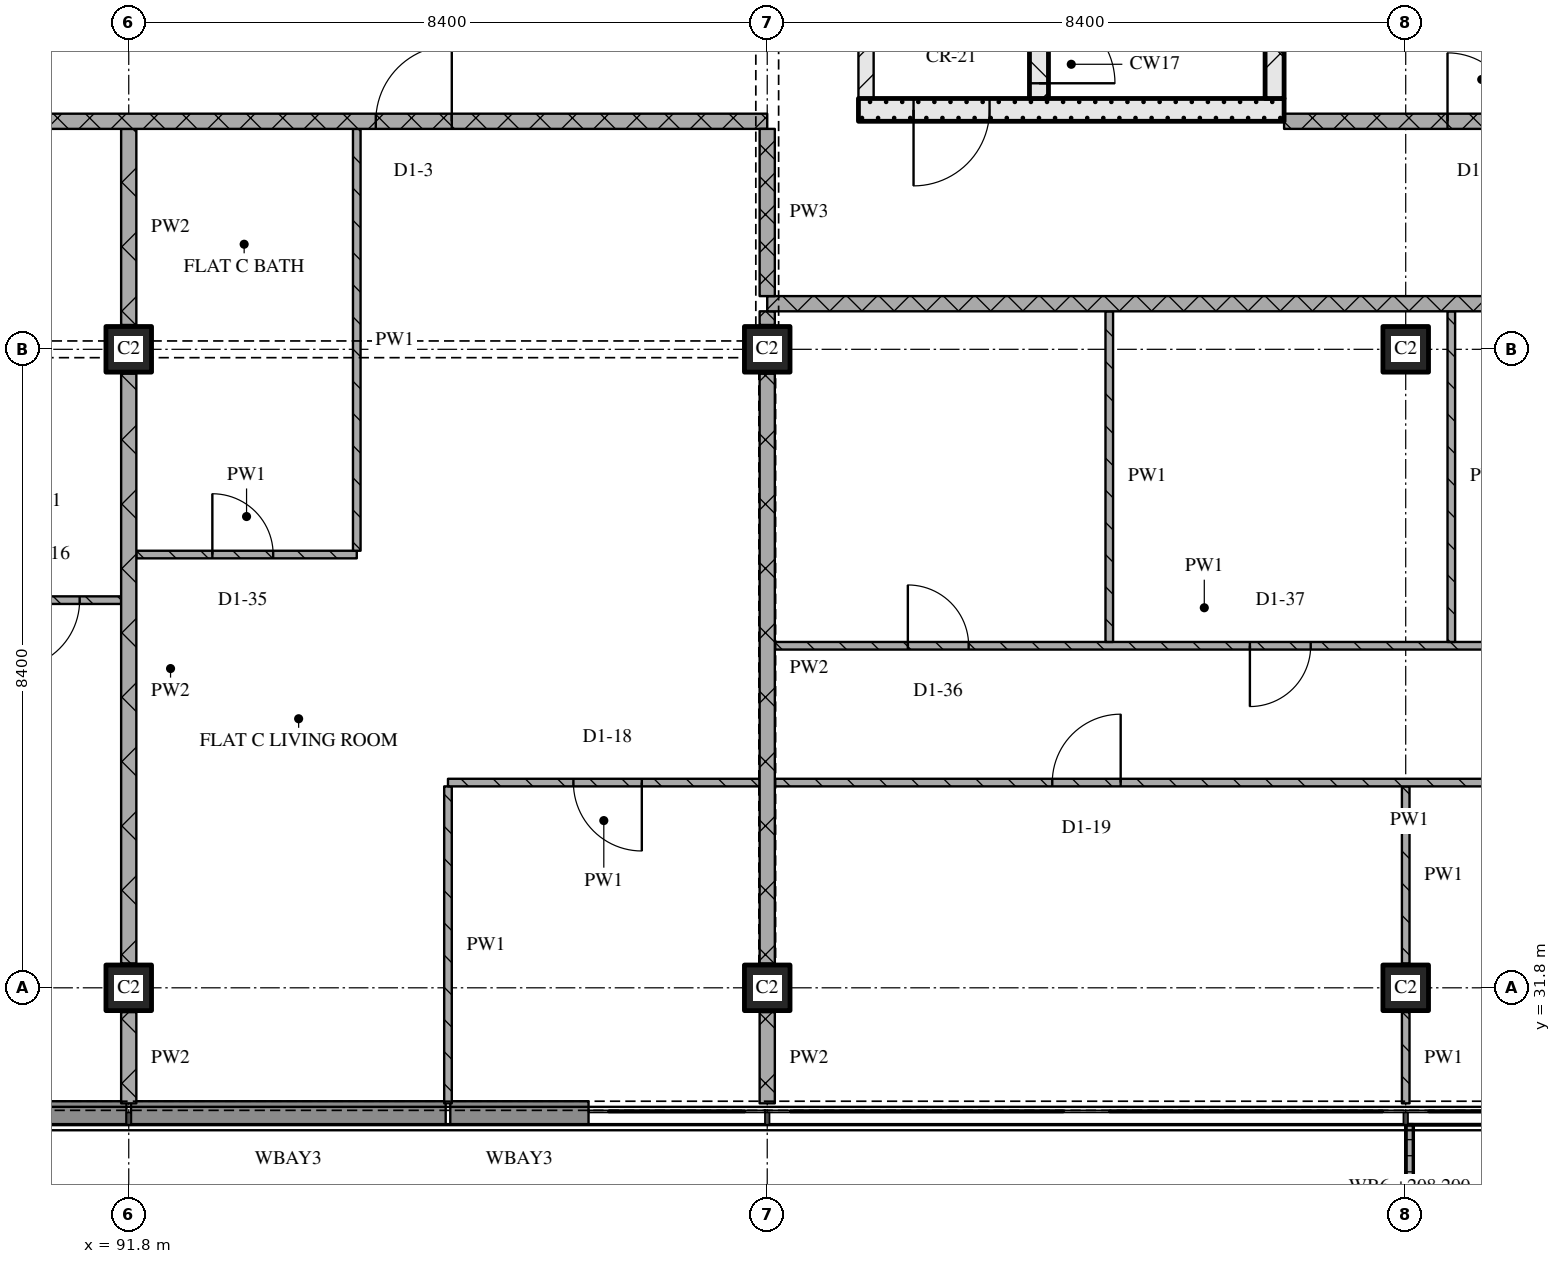
"""IFC4 building model, lengths in metres.
Left out: names, types, materials, properties, quantities, classifications, styles, units other than length and angle.
Written with IfcOpenShell. Run it as: python <this file> out.ifc"""

import sys

from ifc_helpers import new_model, si_unit, direction, frame, frame_2d, origin, origin_2d, place, context, subcontext, project, spatial, polyline, rectangle, outline, extrude, element, fill, save


model = new_model("IFC4")
c1 = context("Model", 3, precision=1e-05, world=origin(), true_north=direction((0.0, 1.0)))
c2 = subcontext(c1, "Body", "Model", "MODEL_VIEW")
j1 = project(units=[si_unit("LENGTHUNIT", "METRE"), si_unit("PLANEANGLEUNIT", "RADIAN")], contexts=[c1])
p1 = place(None, origin())
s1 = spatial("IfcSite", under=j1, at=p1, CompositionType="ELEMENT")
p2 = place(p1, origin())
s2 = spatial("IfcBuilding", under=s1, at=p2, CompositionType="ELEMENT")
p3 = place(p2, frame((0.0, 0.0, 205.5)))
s3 = spatial("IfcBuildingStorey", under=s2, at=p3, CompositionType="ELEMENT", Elevation=205.5)
for number, where, z_axis, x_axis in (
    (1, (91.8, 31.8, 0.0), (0.0, 0.0, 1.0), (1.0, 0.0, 0.0)),
    (2, (91.8, 40.2, 0.0), (0.0, 0.0, 1.0), (1.0, 0.0, 0.0)),
    (3, (100.2, 31.8, 0.0), (0.0, 0.0, 1.0), (1.0, 0.0, 0.0)),
    (4, (100.2, 40.2, 0.0), (0.0, 0.0, 1.0), (1.0, 0.0, 0.0)),
    (5, (108.6, 31.8, 0.0), (0.0, 0.0, 1.0), (1.0, 0.0, 0.0)),
    (6, (108.6, 40.2, 0.0), (0.0, 0.0, 1.0), (1.0, 0.0, 0.0)),
):
    element("IfcColumn", number, at=place(p3, frame(where, z_axis=z_axis, x_axis=x_axis)), inside=s3, PredefinedType="COLUMN", context=c2, shape_type="SweptSolid", body=[
        extrude(rectangle(XDim=0.6, YDim=0.6, at=origin_2d()), origin(), (0.0, 0.0, 1.0), 3.6),
    ])
p4 = place(p3, frame((91.77, 30.154, 0.0), z_axis=(0.0, 0.0, 1.0), x_axis=(-1.0, 0.0, 0.0)))
e7 = element("IfcWall", 7, at=p4, inside=s3, PredefinedType="SOLIDWALL", context=c2, shape_type="SweptSolid", body=[
    extrude(rectangle(XDim=4.14, YDim=0.308, at=frame_2d((2.07, 0.0))), origin(), (0.0, 0.0, 1.0), 3.2),
])
p5 = place(p3, frame((95.97, 30.154, 0.0), z_axis=(0.0, 0.0, 1.0), x_axis=(-1.0, 0.0, 0.0)))
e8 = element("IfcWall", 8, at=p5, inside=s3, PredefinedType="SOLIDWALL", context=c2, shape_type="SweptSolid", body=[
    extrude(rectangle(XDim=4.14, YDim=0.308, at=frame_2d((2.07, 0.0))), origin(), (0.0, 0.0, 1.0), 3.2),
])
p6 = place(p3, frame((97.849, 30.154, 0.0), z_axis=(0.0, 0.0, 1.0), x_axis=(-1.0, 0.0, 0.0)))
e9 = element("IfcWall", 9, at=p6, inside=s3, PredefinedType="SOLIDWALL", context=c2, shape_type="SweptSolid", body=[
    extrude(rectangle(XDim=1.819, YDim=0.308, at=frame_2d((0.91, 0.0))), origin(), (0.0, 0.0, 1.0), 3.2),
])
p7 = place(p3, origin())
e10 = element("IfcWall", 10, at=p7, inside=s3, PredefinedType="SOLIDWALL", context=c2, shape_type="SweptSolid", body=[
    extrude(outline(polyline([(108.6, 30.0), (108.7, 30.0), (108.7, 28.367), (112.7, 28.367), (112.7, 30.0), (112.8, 30.0), (112.8, 28.267), (108.6, 28.267), (108.6, 30.0)])), origin(), (0.0, 0.0, 1.0), 1.0),
])
p8 = place(p3, frame((101.4, 43.35, 0.0), z_axis=(0.0, 0.0, 1.0), x_axis=(1.0, 0.0, 0.0)))
e11 = element("IfcWall", 11, at=p8, inside=s3, PredefinedType="SOLIDWALL", context=c2, shape_type="SweptSolid", body=[
    extrude(rectangle(XDim=5.6, YDim=0.3, at=frame_2d((2.8, 0.0))), origin(), (0.0, 0.0, 1.0), 3.32),
])
p9 = place(p8, frame((0.725, 0.0, 0.0)))
e12 = element("IfcOpeningElement", 12, at=p9, cuts=e11, PredefinedType="OPENING", context=c2, shape_type="SweptSolid", body=[
    extrude(rectangle(XDim=1.0, YDim=2.1, at=frame_2d((0.5, 1.05))), frame((0.0, 0.16, 0.0), z_axis=(0.0, -1.0, 0.0), x_axis=(1.0, 0.0, 0.0)), (0.0, 0.0, 1.0), 0.32),
])
p10 = place(p3, frame((101.5, 43.5, 0.0), z_axis=(0.0, 0.0, 1.0), x_axis=(0.0, 1.0, 0.0)))
e13 = element("IfcWall", 13, at=p10, inside=s3, PredefinedType="PARTITIONING", context=c2, shape_type="SweptSolid", body=[
    extrude(rectangle(XDim=6.9, YDim=0.2, at=frame_2d((3.45, 0.0))), origin(), (0.0, 0.0, 1.0), 3.32),
])
p11 = place(p10, frame((1.0, 0.0, 0.0)))
e14 = element("IfcOpeningElement", 14, at=p11, cuts=e13, PredefinedType="OPENING", context=c2, shape_type="SweptSolid", body=[
    extrude(rectangle(XDim=1.0, YDim=2.1, at=frame_2d((0.5, 1.05))), frame((0.0, 0.11, 0.0), z_axis=(0.0, -1.0, 0.0), x_axis=(1.0, 0.0, 0.0)), (0.0, 0.0, 1.0), 0.22),
])
p12 = place(p3, frame((103.775, 43.5, 0.0), z_axis=(0.0, 0.0, 1.0), x_axis=(0.0, 1.0, 0.0)))
e15 = element("IfcWall", 15, at=p12, inside=s3, PredefinedType="SOLIDWALL", context=c2, shape_type="SweptSolid", body=[
    extrude(rectangle(XDim=6.9, YDim=0.25, at=frame_2d((3.45, 0.0))), origin(), (0.0, 0.0, 1.0), 3.32),
])
p13 = place(p12, frame((0.2, 0.0, 0.0)))
e16 = element("IfcOpeningElement", 16, at=p13, cuts=e15, PredefinedType="OPENING", context=c2, shape_type="SweptSolid", body=[
    extrude(rectangle(XDim=1.0, YDim=2.1, at=frame_2d((0.5, 1.05))), frame((0.0, 0.135, 0.0), z_axis=(0.0, -1.0, 0.0), x_axis=(1.0, 0.0, 0.0)), (0.0, 0.0, 1.0), 0.27),
])
p14 = place(p3, frame((106.875, 43.5, 0.0), z_axis=(0.0, 0.0, 1.0), x_axis=(0.0, 1.0, 0.0)))
e17 = element("IfcWall", 17, at=p14, inside=s3, PredefinedType="SOLIDWALL", context=c2, shape_type="SweptSolid", body=[
    extrude(rectangle(XDim=6.9, YDim=0.25, at=frame_2d((3.45, 0.0))), origin(), (0.0, 0.0, 1.0), 3.32),
])
p15 = place(p3, frame((100.3, 36.3, 0.0), z_axis=(0.0, 0.0, 1.0), x_axis=(1.0, 0.0, 0.0)))
e18 = element("IfcWall", 18, at=p15, inside=s3, PredefinedType="PARTITIONING", context=c2, shape_type="SweptSolid", body=[
    extrude(rectangle(XDim=11.3, YDim=0.1, at=frame_2d((5.65, 0.0))), origin(), (0.0, 0.0, 1.0), 3.32),
])
p16 = place(p15, frame((1.75, 0.0, 0.0)))
e19 = element("IfcOpeningElement", 19, at=p16, cuts=e18, PredefinedType="OPENING", context=c2, shape_type="SweptSolid", body=[
    extrude(rectangle(XDim=0.8, YDim=2.1, at=frame_2d((0.4, 1.05))), frame((0.0, 0.06, 0.0), z_axis=(0.0, -1.0, 0.0), x_axis=(1.0, 0.0, 0.0)), (0.0, 0.0, 1.0), 0.12),
])
p17 = place(p15, frame((6.25, 0.0, 0.0)))
e20 = element("IfcOpeningElement", 20, at=p17, cuts=e18, PredefinedType="OPENING", context=c2, shape_type="SweptSolid", body=[
    extrude(rectangle(XDim=0.8, YDim=2.1, at=frame_2d((0.4, 1.05))), frame((0.0, 0.06, 0.0), z_axis=(0.0, -1.0, 0.0), x_axis=(1.0, 0.0, 0.0)), (0.0, 0.0, 1.0), 0.12),
])
p18 = place(p3, frame((89.608, 36.9, 0.0), z_axis=(0.0, 0.0, 1.0), x_axis=(1.0, 0.0, 0.0)))
e21 = element("IfcWall", 21, at=p18, inside=s3, PredefinedType="PARTITIONING", context=c2, shape_type="SweptSolid", body=[
    extrude(rectangle(XDim=2.092, YDim=0.1, at=frame_2d((1.046, 0.0))), origin(), (0.0, 0.0, 1.0), 3.32),
])
p19 = place(p18, frame((0.646, 0.0, 0.0)))
e22 = element("IfcOpeningElement", 22, at=p19, cuts=e21, PredefinedType="OPENING", context=c2, shape_type="SweptSolid", body=[
    extrude(rectangle(XDim=0.9, YDim=2.1, at=frame_2d((0.45, 1.05))), frame((0.0, 0.06, 0.0), z_axis=(0.0, -1.0, 0.0), x_axis=(1.0, 0.0, 0.0)), (0.0, 0.0, 1.0), 0.12),
])
p20 = place(p3, frame((91.9, 37.5, 0.0), z_axis=(0.0, 0.0, 1.0), x_axis=(1.0, 0.0, 0.0)))
e23 = element("IfcWall", 23, at=p20, inside=s3, PredefinedType="PARTITIONING", context=c2, shape_type="SweptSolid", body=[
    extrude(rectangle(XDim=2.9, YDim=0.1, at=frame_2d((1.45, 0.0))), origin(), (0.0, 0.0, 1.0), 3.32),
])
p21 = place(p20, frame((1.0, 0.0, 0.0)))
e24 = element("IfcOpeningElement", 24, at=p21, cuts=e23, PredefinedType="OPENING", context=c2, shape_type="SweptSolid", body=[
    extrude(rectangle(XDim=0.8, YDim=2.1, at=frame_2d((0.4, 1.05))), frame((0.0, 0.06, 0.0), z_axis=(0.0, -1.0, 0.0), x_axis=(1.0, 0.0, 0.0)), (0.0, 0.0, 1.0), 0.12),
])
p22 = place(p3, frame((124.58, 40.8, 0.0), z_axis=(0.0, 0.0, 1.0), x_axis=(-1.0, 0.0, 0.0)))
e25 = element("IfcWall", 25, at=p22, inside=s3, PredefinedType="PARTITIONING", context=c2, shape_type="SweptSolid", body=[
    extrude(rectangle(XDim=24.38, YDim=0.2, at=frame_2d((12.19, 0.0))), origin(), (0.0, 0.0, 1.0), 3.32),
])
p23 = place(p22, frame((11.73, 0.0, 0.0)))
e26 = element("IfcOpeningElement", 26, at=p23, cuts=e25, PredefinedType="OPENING", context=c2, shape_type="SweptSolid", body=[
    extrude(rectangle(XDim=1.0, YDim=2.1, at=frame_2d((0.5, 1.05))), frame((0.0, 0.11, 0.0), z_axis=(0.0, -1.0, 0.0), x_axis=(1.0, 0.0, 0.0)), (0.0, 0.0, 1.0), 0.22),
])
p24 = place(p3, frame((100.2, 43.2, 0.0), z_axis=(0.0, 0.0, 1.0), x_axis=(-1.0, 0.0, 0.0)))
e27 = element("IfcWall", 27, at=p24, inside=s3, PredefinedType="PARTITIONING", context=c2, shape_type="SweptSolid", body=[
    extrude(rectangle(XDim=25.2, YDim=0.2, at=frame_2d((12.6, 0.0))), origin(), (0.0, 0.0, 1.0), 3.32),
])
p25 = place(p24, frame((4.15, 0.0, 0.0)))
e28 = element("IfcOpeningElement", 28, at=p25, cuts=e27, PredefinedType="OPENING", context=c2, shape_type="SweptSolid", body=[
    extrude(rectangle(XDim=1.0, YDim=2.1, at=frame_2d((0.5, 1.05))), frame((0.0, 0.11, 0.0), z_axis=(0.0, -1.0, 0.0), x_axis=(1.0, 0.0, 0.0)), (0.0, 0.0, 1.0), 0.22),
])
p26 = place(p24, frame((17.35, 0.0, 0.0)))
e29 = element("IfcOpeningElement", 29, at=p26, cuts=e27, PredefinedType="OPENING", context=c2, shape_type="SweptSolid", body=[
    extrude(rectangle(XDim=1.0, YDim=2.1, at=frame_2d((0.5, 1.05))), frame((0.0, 0.11, 0.0), z_axis=(0.0, -1.0, 0.0), x_axis=(1.0, 0.0, 0.0)), (0.0, 0.0, 1.0), 0.22),
])
p27 = place(p3, frame((107.0, 43.2, 0.0), z_axis=(0.0, 0.0, 1.0), x_axis=(1.0, 0.0, 0.0)))
e30 = element("IfcWall", 30, at=p27, inside=s3, PredefinedType="PARTITIONING", context=c2, shape_type="SweptSolid", body=[
    extrude(rectangle(XDim=5.2, YDim=0.2, at=frame_2d((2.6, 0.0))), origin(), (0.0, 0.0, 1.0), 3.32),
])
p28 = place(p27, frame((2.15, 0.0, 0.0)))
e31 = element("IfcOpeningElement", 31, at=p28, cuts=e30, PredefinedType="OPENING", context=c2, shape_type="SweptSolid", body=[
    extrude(rectangle(XDim=0.9, YDim=2.1, at=frame_2d((0.45, 1.05))), frame((0.0, 0.11, 0.0), z_axis=(0.0, -1.0, 0.0), x_axis=(1.0, 0.0, 0.0)), (0.0, 0.0, 1.0), 0.22),
])
p29 = place(p3, frame((91.8, 31.48, 0.0), z_axis=(0.0, 0.0, 1.0), x_axis=(0.0, -1.0, 0.0)))
e32 = element("IfcWall", 32, at=p29, inside=s3, PredefinedType="PARTITIONING", context=c2, shape_type="SweptSolid", body=[
    extrude(rectangle(XDim=1.2, YDim=0.2, at=frame_2d((0.6, 0.0))), origin(), (0.0, 0.0, 1.0), 3.32),
])
p30 = place(p3, frame((91.8, 39.88, 0.0), z_axis=(0.0, 0.0, 1.0), x_axis=(0.0, -1.0, 0.0)))
e33 = element("IfcWall", 33, at=p30, inside=s3, PredefinedType="PARTITIONING", context=c2, shape_type="SweptSolid", body=[
    extrude(rectangle(XDim=7.76, YDim=0.2, at=frame_2d((3.88, 0.0))), origin(), (0.0, 0.0, 1.0), 3.32),
])
p31 = place(p3, frame((91.8, 43.1, 0.0), z_axis=(0.0, 0.0, 1.0), x_axis=(0.0, -1.0, 0.0)))
e34 = element("IfcWall", 34, at=p31, inside=s3, PredefinedType="PARTITIONING", context=c2, shape_type="SweptSolid", body=[
    extrude(rectangle(XDim=2.58, YDim=0.2, at=frame_2d((1.29, 0.0))), origin(), (0.0, 0.0, 1.0), 3.32),
])
p32 = place(p3, frame((94.8, 43.1, 0.0), z_axis=(0.0, 0.0, 1.0), x_axis=(0.0, -1.0, 0.0)))
e35 = element("IfcWall", 35, at=p32, inside=s3, PredefinedType="PARTITIONING", context=c2, shape_type="SweptSolid", body=[
    extrude(rectangle(XDim=5.55, YDim=0.1, at=frame_2d((2.775, 0.0))), origin(), (0.0, 0.0, 1.0), 3.32),
])
p33 = place(p3, frame((96.0, 34.45, 0.0), z_axis=(0.0, 0.0, 1.0), x_axis=(0.0, -1.0, 0.0)))
e36 = element("IfcWall", 36, at=p33, inside=s3, PredefinedType="PARTITIONING", context=c2, shape_type="SweptSolid", body=[
    extrude(rectangle(XDim=4.17, YDim=0.1, at=frame_2d((2.085, 0.0))), origin(), (0.0, 0.0, 1.0), 3.32),
])
p34 = place(p3, frame((100.2, 43.1, 0.0), z_axis=(0.0, 0.0, 1.0), x_axis=(0.0, -1.0, 0.0)))
e37 = element("IfcWall", 37, at=p34, inside=s3, PredefinedType="PARTITIONING", context=c2, shape_type="SweptSolid", body=[
    extrude(rectangle(XDim=2.2, YDim=0.2, at=frame_2d((1.1, 0.0))), origin(), (0.0, 0.0, 1.0), 2.53),
])
p35 = place(p3, frame((100.2, 31.48, 0.0), z_axis=(0.0, 0.0, 1.0), x_axis=(0.0, -1.0, 0.0)))
e38 = element("IfcWall", 38, at=p35, inside=s3, PredefinedType="PARTITIONING", context=c2, shape_type="SweptSolid", body=[
    extrude(rectangle(XDim=1.2, YDim=0.2, at=frame_2d((0.6, 0.0))), origin(), (0.0, 0.0, 1.0), 3.32),
])
p36 = place(p3, frame((100.2, 39.88, 0.0), z_axis=(0.0, 0.0, 1.0), x_axis=(0.0, -1.0, 0.0)))
e39 = element("IfcWall", 39, at=p36, inside=s3, PredefinedType="PARTITIONING", context=c2, shape_type="SweptSolid", body=[
    extrude(rectangle(XDim=7.76, YDim=0.2, at=frame_2d((3.88, 0.0))), origin(), (0.0, 0.0, 1.0), 2.72),
])
p37 = place(p3, frame((100.2, 40.7, 0.0), z_axis=(0.0, 0.0, 1.0), x_axis=(0.0, -1.0, 0.0)))
e40 = element("IfcWall", 40, at=p37, inside=s3, PredefinedType="PARTITIONING", context=c2, shape_type="SweptSolid", body=[
    extrude(rectangle(XDim=0.18, YDim=0.2, at=frame_2d((0.09, 0.0))), origin(), (0.0, 0.0, 1.0), 3.32),
])
p38 = place(p3, frame((104.7, 40.7, 0.0), z_axis=(0.0, 0.0, 1.0), x_axis=(0.0, -1.0, 0.0)))
e41 = element("IfcWall", 41, at=p38, inside=s3, PredefinedType="PARTITIONING", context=c2, shape_type="SweptSolid", body=[
    extrude(rectangle(XDim=4.35, YDim=0.1, at=frame_2d((2.175, 0.0))), origin(), (0.0, 0.0, 1.0), 3.32),
])
p39 = place(p3, frame((108.6, 31.48, 0.0), z_axis=(0.0, 0.0, 1.0), x_axis=(0.0, -1.0, 0.0)))
e42 = element("IfcWall", 42, at=p39, inside=s3, PredefinedType="PARTITIONING", context=c2, shape_type="SweptSolid", body=[
    extrude(rectangle(XDim=1.2, YDim=0.1, at=frame_2d((0.6, 0.0))), origin(), (0.0, 0.0, 1.0), 3.32),
])
p40 = place(p3, frame((108.6, 34.45, 0.0), z_axis=(0.0, 0.0, 1.0), x_axis=(0.0, -1.0, 0.0)))
e43 = element("IfcWall", 43, at=p40, inside=s3, PredefinedType="PARTITIONING", context=c2, shape_type="SweptSolid", body=[
    extrude(rectangle(XDim=2.33, YDim=0.1, at=frame_2d((1.165, 0.0))), origin(), (0.0, 0.0, 1.0), 3.32),
])
p41 = place(p3, frame((109.2, 40.7, 0.0), z_axis=(0.0, 0.0, 1.0), x_axis=(0.0, -1.0, 0.0)))
e44 = element("IfcWall", 44, at=p41, inside=s3, PredefinedType="PARTITIONING", context=c2, shape_type="SweptSolid", body=[
    extrude(rectangle(XDim=4.35, YDim=0.1, at=frame_2d((2.175, 0.0))), origin(), (0.0, 0.0, 1.0), 3.32),
])
p42 = place(p3, frame((100.1, 34.5, 0.0), z_axis=(0.0, 0.0, 1.0), x_axis=(-1.0, 0.0, 0.0)))
e45 = element("IfcWall", 45, at=p42, inside=s3, PredefinedType="PARTITIONING", context=c2, shape_type="SweptSolid", body=[
    extrude(rectangle(XDim=4.1, YDim=0.1, at=frame_2d((2.05, 0.0))), origin(), (0.0, 0.0, 1.0), 3.32),
])
p43 = place(p42, frame((1.55, 0.0, 0.0)))
e46 = element("IfcOpeningElement", 46, at=p43, cuts=e45, PredefinedType="OPENING", context=c2, shape_type="SweptSolid", body=[
    extrude(rectangle(XDim=0.9, YDim=2.1, at=frame_2d((0.45, 1.05))), frame((0.0, 0.06, 0.0), z_axis=(0.0, -1.0, 0.0), x_axis=(1.0, 0.0, 0.0)), (0.0, 0.0, 1.0), 0.12),
])
p44 = place(p3, frame((117.0, 34.5, 0.0), z_axis=(0.0, 0.0, 1.0), x_axis=(-1.0, 0.0, 0.0)))
e47 = element("IfcWall", 47, at=p44, inside=s3, PredefinedType="PARTITIONING", context=c2, shape_type="SweptSolid", body=[
    extrude(rectangle(XDim=16.7, YDim=0.1, at=frame_2d((8.35, 0.0))), origin(), (0.0, 0.0, 1.0), 3.32),
])
p45 = place(p44, frame((12.15, 0.0, 0.0)))
e48 = element("IfcOpeningElement", 48, at=p45, cuts=e47, PredefinedType="OPENING", context=c2, shape_type="SweptSolid", body=[
    extrude(rectangle(XDim=0.9, YDim=2.1, at=frame_2d((0.45, 1.05))), frame((0.0, 0.06, 0.0), z_axis=(0.0, -1.0, 0.0), x_axis=(1.0, 0.0, 0.0)), (0.0, 0.0, 1.0), 0.12),
])
p46 = place(p9, origin())
e49 = element("IfcDoor", 49, at=p46, inside=s3, OperationType="SINGLE_SWING_RIGHT", PredefinedType="DOOR", context=c2, shape_type="SweptSolid", body=[
    extrude(rectangle(XDim=1.0, YDim=2.1, at=frame_2d((0.5, 1.05))), frame((0.0, 0.025, 0.0), z_axis=(0.0, -1.0, 0.0), x_axis=(1.0, 0.0, 0.0)), (0.0, 0.0, 1.0), 0.05),
])
fill(e12, e49)
p47 = place(p13, origin())
e50 = element("IfcDoor", 50, at=p47, inside=s3, OperationType="SINGLE_SWING_RIGHT", PredefinedType="DOOR", context=c2, shape_type="SweptSolid", body=[
    extrude(rectangle(XDim=1.0, YDim=2.1, at=frame_2d((0.5, 1.05))), frame((0.0, 0.025, 0.0), z_axis=(0.0, -1.0, 0.0), x_axis=(1.0, 0.0, 0.0)), (0.0, 0.0, 1.0), 0.05),
])
fill(e16, e50)
p48 = place(p16, origin())
e51 = element("IfcDoor", 51, at=p48, inside=s3, OperationType="SINGLE_SWING_LEFT", PredefinedType="DOOR", context=c2, shape_type="SweptSolid", body=[
    extrude(rectangle(XDim=0.8, YDim=2.1, at=frame_2d((0.4, 1.05))), frame((0.0, 0.025, 0.0), z_axis=(0.0, -1.0, 0.0), x_axis=(1.0, 0.0, 0.0)), (0.0, 0.0, 1.0), 0.05),
])
fill(e19, e51)
p49 = place(p17, origin())
e52 = element("IfcDoor", 52, at=p49, inside=s3, OperationType="SINGLE_SWING_RIGHT", PredefinedType="DOOR", context=c2, shape_type="SweptSolid", body=[
    extrude(rectangle(XDim=0.8, YDim=2.1, at=frame_2d((0.4, 1.05))), frame((0.0, 0.025, 0.0), z_axis=(0.0, -1.0, 0.0), x_axis=(1.0, 0.0, 0.0)), (0.0, 0.0, 1.0), 0.05),
])
fill(e20, e52)
p50 = place(p19, origin())
e53 = element("IfcDoor", 53, at=p50, inside=s3, OperationType="SINGLE_SWING_RIGHT", PredefinedType="DOOR", context=c2, shape_type="SweptSolid", body=[
    extrude(rectangle(XDim=0.9, YDim=2.1, at=frame_2d((0.45, 1.05))), frame((0.0, 0.025, 0.0), z_axis=(0.0, -1.0, 0.0), x_axis=(1.0, 0.0, 0.0)), (0.0, 0.0, 1.0), 0.05),
])
fill(e22, e53)
p51 = place(p21, origin())
e54 = element("IfcDoor", 54, at=p51, inside=s3, OperationType="SINGLE_SWING_LEFT", PredefinedType="DOOR", context=c2, shape_type="SweptSolid", body=[
    extrude(rectangle(XDim=0.8, YDim=2.1, at=frame_2d((0.4, 1.05))), frame((0.0, 0.025, 0.0), z_axis=(0.0, -1.0, 0.0), x_axis=(1.0, 0.0, 0.0)), (0.0, 0.0, 1.0), 0.05),
])
fill(e24, e54)
p52 = place(p25, origin())
e55 = element("IfcDoor", 55, at=p52, inside=s3, OperationType="SINGLE_SWING_RIGHT", PredefinedType="DOOR", context=c2, shape_type="SweptSolid", body=[
    extrude(rectangle(XDim=1.0, YDim=2.1, at=frame_2d((0.5, 1.05))), frame((0.0, 0.025, 0.0), z_axis=(0.0, -1.0, 0.0), x_axis=(1.0, 0.0, 0.0)), (0.0, 0.0, 1.0), 0.05),
])
fill(e28, e55)
p53 = place(p28, origin())
e56 = element("IfcDoor", 56, at=p53, inside=s3, OperationType="SINGLE_SWING_LEFT", PredefinedType="DOOR", context=c2, shape_type="SweptSolid", body=[
    extrude(rectangle(XDim=0.9, YDim=2.1, at=frame_2d((0.45, 1.05))), frame((0.0, 0.025, 0.0), z_axis=(0.0, -1.0, 0.0), x_axis=(1.0, 0.0, 0.0)), (0.0, 0.0, 1.0), 0.05),
])
fill(e31, e56)
p54 = place(p43, origin())
e57 = element("IfcDoor", 57, at=p54, inside=s3, OperationType="SINGLE_SWING_LEFT", PredefinedType="DOOR", context=c2, shape_type="SweptSolid", body=[
    extrude(rectangle(XDim=0.9, YDim=2.1, at=frame_2d((0.45, 1.05))), frame((0.0, 0.025, 0.0), z_axis=(0.0, -1.0, 0.0), x_axis=(1.0, 0.0, 0.0)), (0.0, 0.0, 1.0), 0.05),
])
fill(e46, e57)
p55 = place(p45, origin())
e58 = element("IfcDoor", 58, at=p55, inside=s3, OperationType="SINGLE_SWING_RIGHT", PredefinedType="DOOR", context=c2, shape_type="SweptSolid", body=[
    extrude(rectangle(XDim=0.9, YDim=2.1, at=frame_2d((0.45, 1.05))), frame((0.0, 0.025, 0.0), z_axis=(0.0, -1.0, 0.0), x_axis=(1.0, 0.0, 0.0)), (0.0, 0.0, 1.0), 0.05),
])
fill(e48, e58)
save(model, sys.argv[1])
